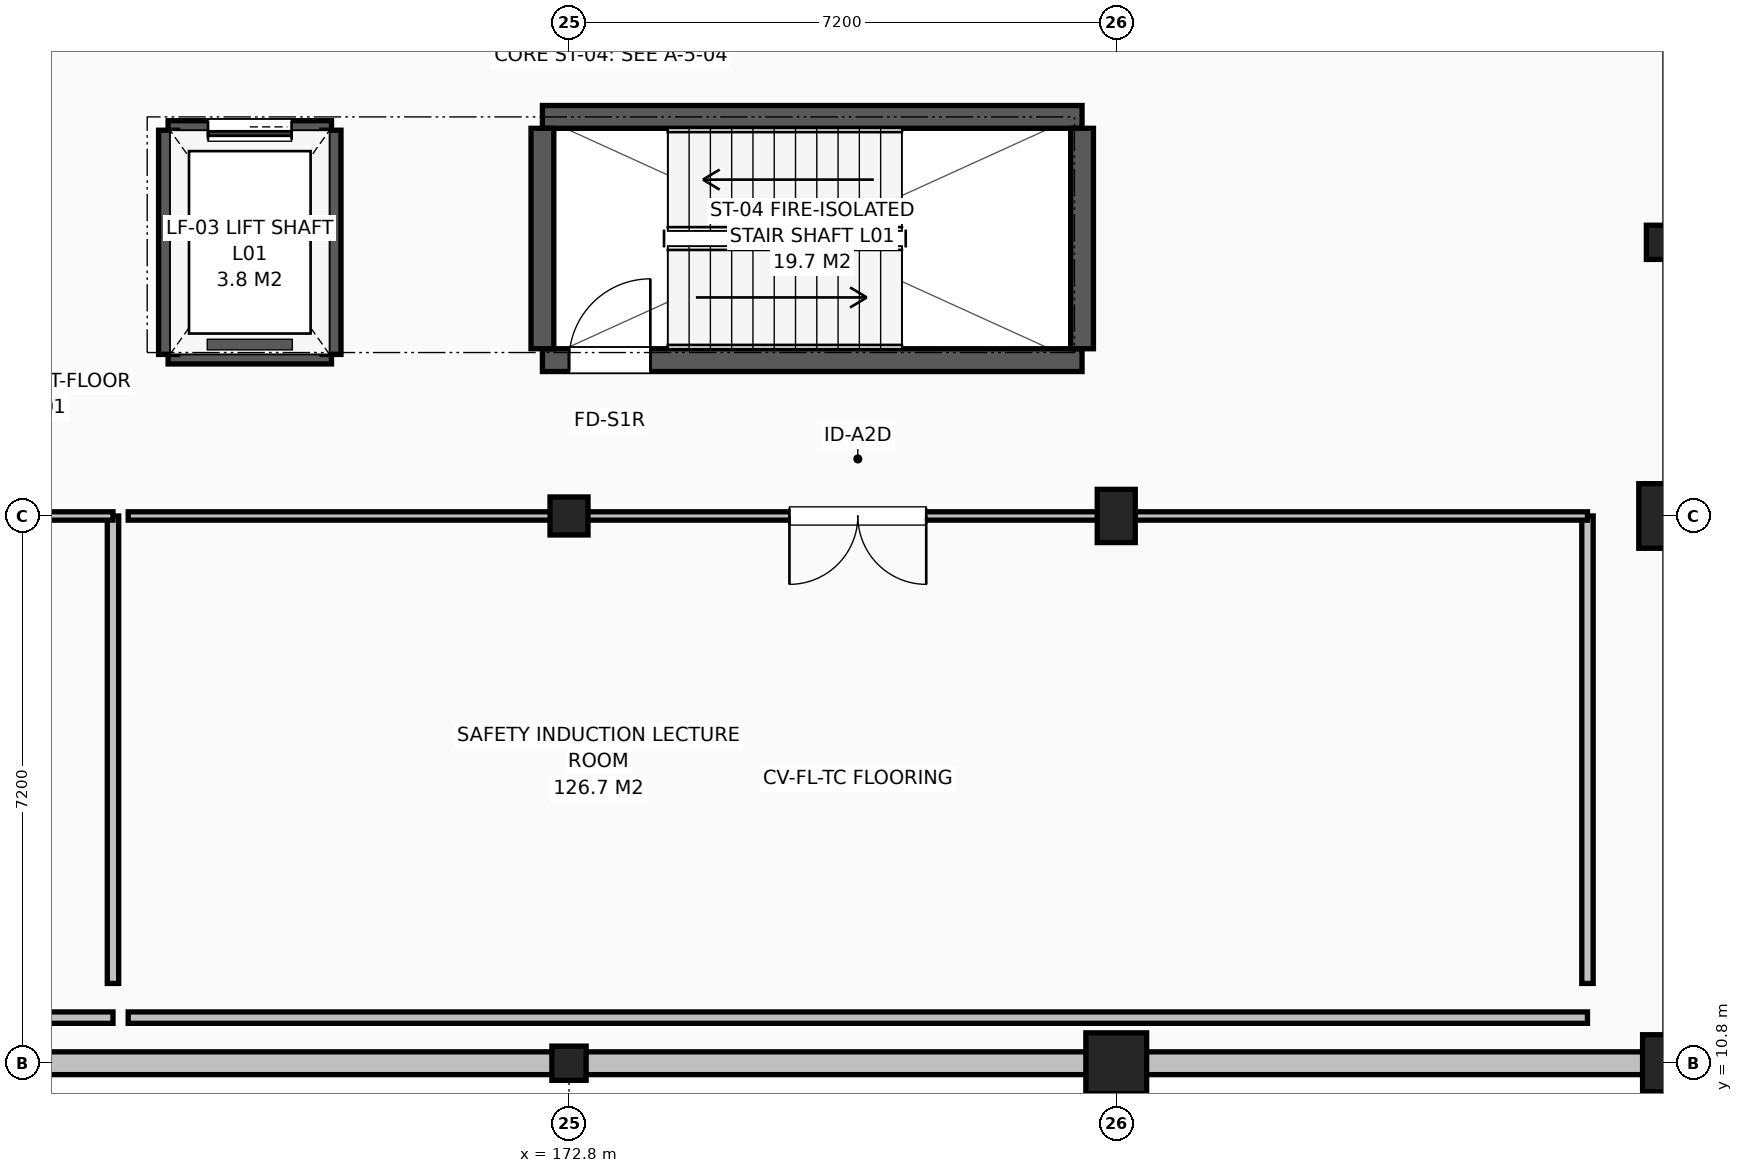
"""IFC4 building model, lengths in metres.
Left out: names, types, materials, properties, quantities, classifications, styles, units other than length and angle.
Written with IfcOpenShell. Run it as: python <this file> out.ifc"""

import sys

from ifc_helpers import new_model, si_unit, direction, frame, frame_2d, origin, origin_2d, place, context, subcontext, project, spatial, rectangle, extrude, element, fill, save


model = new_model("IFC4")
c1 = context("Model", 3, precision=1e-05, world=origin(), true_north=direction((0.0, 1.0)))
c2 = subcontext(c1, "Body", "Model", "MODEL_VIEW")
j1 = project(units=[si_unit("LENGTHUNIT", "METRE"), si_unit("PLANEANGLEUNIT", "RADIAN")], contexts=[c1])
p1 = place(None, origin())
s1 = spatial("IfcSite", under=j1, at=p1, CompositionType="ELEMENT")
p2 = place(p1, origin())
s2 = spatial("IfcBuilding", under=s1, at=p2, CompositionType="ELEMENT")
p3 = place(p2, frame((0.0, 0.0, 4.8)))
s3 = spatial("IfcBuildingStorey", under=s2, at=p3, CompositionType="ELEMENT", Elevation=4.8)
p4 = place(p3, frame((172.8, 10.8, 0.0), z_axis=(0.0, 0.0, 1.0), x_axis=(1.0, 0.0, 0.0)))
e1 = element("IfcColumn", 1, at=p4, inside=s3, PredefinedType="COLUMN", context=c2, shape_type="SweptSolid", body=[
    extrude(rectangle(XDim=0.45, YDim=0.45, at=origin_2d()), origin(), (0.0, 0.0, 1.0), 4.2),
])
p5 = place(p3, frame((172.8, 18.0, 0.0), z_axis=(0.0, 0.0, 1.0), x_axis=(1.0, 0.0, 0.0)))
e2 = element("IfcColumn", 2, at=p5, inside=s3, PredefinedType="COLUMN", context=c2, shape_type="SweptSolid", body=[
    extrude(rectangle(XDim=0.5, YDim=0.5, at=origin_2d()), origin(), (0.0, 0.0, 1.0), 4.2),
])
p6 = place(p3, frame((180.0, 10.8, 0.0), z_axis=(0.0, 0.0, 1.0), x_axis=(1.0, 0.0, 0.0)))
e3 = element("IfcColumn", 3, at=p6, inside=s3, PredefinedType="COLUMN", context=c2, shape_type="SweptSolid", body=[
    extrude(rectangle(XDim=0.8, YDim=0.8, at=origin_2d()), origin(), (0.0, 0.0, 1.0), 4.2),
])
p7 = place(p3, frame((180.0, 18.0, 0.0), z_axis=(0.0, 0.0, 1.0), x_axis=(1.0, 0.0, 0.0)))
e4 = element("IfcColumn", 4, at=p7, inside=s3, PredefinedType="COLUMN", context=c2, shape_type="SweptSolid", body=[
    extrude(rectangle(XDim=0.5, YDim=0.7, at=origin_2d()), origin(), (0.0, 0.0, 1.0), 4.2),
])
p8 = place(p3, frame((187.2, 10.8, 0.0), z_axis=(0.0, 0.0, 1.0), x_axis=(1.0, 0.0, 0.0)))
e5 = element("IfcColumn", 5, at=p8, inside=s3, PredefinedType="COLUMN", context=c2, shape_type="SweptSolid", body=[
    extrude(rectangle(XDim=0.55, YDim=0.75, at=origin_2d()), origin(), (0.0, 0.0, 1.0), 4.2),
])
p9 = place(p3, frame((187.2, 18.0, 0.0), z_axis=(0.0, 0.0, 1.0), x_axis=(1.0, 0.0, 0.0)))
e6 = element("IfcColumn", 6, at=p9, inside=s3, PredefinedType="COLUMN", context=c2, shape_type="SweptSolid", body=[
    extrude(rectangle(XDim=0.65, YDim=0.85, at=origin_2d()), origin(), (0.0, 0.0, 1.0), 4.2),
])
p10 = place(p3, frame((187.2, 21.6, 0.0), z_axis=(0.0, 0.0, 1.0), x_axis=(1.0, 0.0, 0.0)))
e7 = element("IfcColumn", 7, at=p10, inside=s3, PredefinedType="COLUMN", context=c2, shape_type="SweptSolid", body=[
    extrude(rectangle(XDim=0.45, YDim=0.45, at=origin_2d()), origin(), (0.0, 0.0, 1.0), 4.2),
])
p11 = place(p3, frame((108.0, 10.8, 0.0), z_axis=(0.0, 0.0, 1.0), x_axis=(1.0, 0.0, 0.0)))
e8 = element("IfcWall", 8, at=p11, inside=s3, PredefinedType="SOLIDWALL", context=c2, shape_type="SweptSolid", body=[
    extrude(rectangle(XDim=79.2, YDim=0.3, at=frame_2d((39.6, 0.0))), origin(), (0.0, 0.0, 1.0), 2.872),
])
p12 = place(p3, frame((172.45, 20.05, 0.0), z_axis=(0.0, 0.0, 1.0), x_axis=(1.0, 0.0, 0.0)))
e9 = element("IfcWall", 9, at=p12, inside=s3, PredefinedType="SHEAR", context=c2, shape_type="SweptSolid", body=[
    extrude(rectangle(XDim=7.1, YDim=0.3, at=frame_2d((3.55, 0.0))), origin(), (0.0, 0.0, 1.0), 3.84),
])
p13 = place(p12, frame((0.35, 0.0, 0.0)))
e10 = element("IfcOpeningElement", 10, at=p13, cuts=e9, PredefinedType="OPENING", context=c2, shape_type="SweptSolid", body=[
    extrude(rectangle(XDim=1.07, YDim=2.15, at=frame_2d((0.535, 1.075))), frame((0.0, 0.16, 0.0), z_axis=(0.0, -1.0, 0.0), x_axis=(1.0, 0.0, 0.0)), (0.0, 0.0, 1.0), 0.32),
])
p14 = place(p3, frame((179.55, 23.25, 0.0), z_axis=(0.0, 0.0, 1.0), x_axis=(-1.0, 0.0, 0.0)))
e11 = element("IfcWall", 11, at=p14, inside=s3, PredefinedType="SHEAR", context=c2, shape_type="SweptSolid", body=[
    extrude(rectangle(XDim=7.1, YDim=0.3, at=frame_2d((3.55, 0.0))), origin(), (0.0, 0.0, 1.0), 3.84),
])
for number, where, z_axis, x_axis in (
    (12, (179.55, 20.2, 0.0), (0.0, 0.0, 1.0), (0.0, 1.0, 0.0)),
    (13, (172.45, 23.1, 0.0), (0.0, 0.0, 1.0), (0.0, -1.0, 0.0)),
):
    element("IfcWall", number, at=place(p3, frame(where, z_axis=z_axis, x_axis=x_axis)), inside=s3, PredefinedType="SHEAR", context=c2, shape_type="SweptSolid", body=[
        extrude(rectangle(XDim=2.9, YDim=0.3, at=frame_2d((1.45, 0.0))), origin(), (0.0, 0.0, 1.0), 3.84),
    ])
p15 = place(p3, frame((167.525, 20.125, 0.0), z_axis=(0.0, 0.0, 1.0), x_axis=(1.0, 0.0, 0.0)))
e14 = element("IfcWall", 14, at=p15, inside=s3, PredefinedType="SHEAR", context=c2, shape_type="SweptSolid", body=[
    extrude(rectangle(XDim=2.15, YDim=0.25, at=frame_2d((1.075, 0.0))), origin(), (0.0, 0.0, 1.0), 3.9),
])
p16 = place(p3, frame((169.675, 23.075, 0.0), z_axis=(0.0, 0.0, 1.0), x_axis=(-1.0, 0.0, 0.0)))
e15 = element("IfcWall", 15, at=p16, inside=s3, PredefinedType="SHEAR", context=c2, shape_type="SweptSolid", body=[
    extrude(rectangle(XDim=2.15, YDim=0.25, at=frame_2d((1.075, 0.0))), origin(), (0.0, 0.0, 1.0), 3.9),
])
p17 = place(p16, frame((0.525, 0.0, 0.0)))
e16 = element("IfcOpeningElement", 16, at=p17, cuts=e15, PredefinedType="OPENING", context=c2, shape_type="SweptSolid", body=[
    extrude(rectangle(XDim=1.1, YDim=2.15, at=frame_2d((0.55, 1.075))), frame((0.0, 0.135, 0.0), z_axis=(0.0, -1.0, 0.0), x_axis=(1.0, 0.0, 0.0)), (0.0, 0.0, 1.0), 0.27),
])
for number, where, z_axis, x_axis in (
    (17, (167.525, 23.075, 0.0), (0.0, 0.0, 1.0), (0.0, -1.0, 0.0)),
    (18, (169.675, 20.125, 0.0), (0.0, 0.0, 1.0), (0.0, 1.0, 0.0)),
):
    element("IfcWall", number, at=place(p3, frame(where, z_axis=z_axis, x_axis=x_axis)), inside=s3, PredefinedType="SHEAR", context=c2, shape_type="SweptSolid", body=[
        extrude(rectangle(XDim=2.95, YDim=0.25, at=frame_2d((1.475, 0.0))), origin(), (0.0, 0.0, 1.0), 3.9),
    ])
p18 = place(p3, frame((166.8, 11.4, 0.0), z_axis=(0.0, 0.0, 1.0), x_axis=(-1.0, 0.0, 0.0)))
e19 = element("IfcWall", 19, at=p18, inside=s3, PredefinedType="PARTITIONING", context=c2, shape_type="SweptSolid", body=[
    extrude(rectangle(XDim=19.6, YDim=0.15, at=frame_2d((9.8, 0.0))), origin(), (0.0, 0.0, 1.0), 3.072),
])
p19 = place(p3, frame((166.8, 11.85, 0.0), z_axis=(0.0, 0.0, 1.0), x_axis=(0.0, 1.0, 0.0)))
e20 = element("IfcWall", 20, at=p19, inside=s3, PredefinedType="PARTITIONING", context=c2, shape_type="SweptSolid", body=[
    extrude(rectangle(XDim=6.15, YDim=0.15, at=frame_2d((3.075, 0.0))), origin(), (0.0, 0.0, 1.0), 3.272),
])
p20 = place(p3, frame((147.2, 18.0, 0.0), z_axis=(0.0, 0.0, 1.0), x_axis=(1.0, 0.0, 0.0)))
e21 = element("IfcWall", 21, at=p20, inside=s3, PredefinedType="PARTITIONING", context=c2, shape_type="SweptSolid", body=[
    extrude(rectangle(XDim=19.6, YDim=0.11, at=frame_2d((9.8, 0.0))), origin(), (0.0, 0.0, 1.0), 3.222),
])
p21 = place(p20, frame((9.28, 0.0, 0.0)))
e22 = element("IfcOpeningElement", 22, at=p21, cuts=e21, PredefinedType="OPENING", context=c2, shape_type="SweptSolid", body=[
    extrude(rectangle(XDim=1.04, YDim=2.15, at=frame_2d((0.52, 1.075))), frame((0.0, 0.065, 0.0), z_axis=(0.0, -1.0, 0.0), x_axis=(1.0, 0.0, 0.0)), (0.0, 0.0, 1.0), 0.13),
])
p22 = place(p3, frame((186.2, 11.4, 0.0), z_axis=(0.0, 0.0, 1.0), x_axis=(-1.0, 0.0, 0.0)))
e23 = element("IfcWall", 23, at=p22, inside=s3, PredefinedType="PARTITIONING", context=c2, shape_type="SweptSolid", body=[
    extrude(rectangle(XDim=19.2, YDim=0.15, at=frame_2d((9.6, 0.0))), origin(), (0.0, 0.0, 1.0), 2.872),
])
p23 = place(p3, frame((186.2, 11.85, 0.0), z_axis=(0.0, 0.0, 1.0), x_axis=(0.0, 1.0, 0.0)))
e24 = element("IfcWall", 24, at=p23, inside=s3, PredefinedType="PARTITIONING", context=c2, shape_type="SweptSolid", body=[
    extrude(rectangle(XDim=6.15, YDim=0.15, at=frame_2d((3.075, 0.0))), origin(), (0.0, 0.0, 1.0), 3.222),
])
p24 = place(p3, frame((167.0, 18.0, 0.0), z_axis=(0.0, 0.0, 1.0), x_axis=(1.0, 0.0, 0.0)))
e25 = element("IfcWall", 25, at=p24, inside=s3, PredefinedType="PARTITIONING", context=c2, shape_type="SweptSolid", body=[
    extrude(rectangle(XDim=19.2, YDim=0.11, at=frame_2d((9.6, 0.0))), origin(), (0.0, 0.0, 1.0), 3.172),
])
p25 = place(p24, frame((8.7, 0.0, 0.0)))
e26 = element("IfcOpeningElement", 26, at=p25, cuts=e25, PredefinedType="OPENING", context=c2, shape_type="SweptSolid", body=[
    extrude(rectangle(XDim=1.8, YDim=2.2, at=frame_2d((0.9, 1.1))), frame((0.0, 0.065, 0.0), z_axis=(0.0, -1.0, 0.0), x_axis=(1.0, 0.0, 0.0)), (0.0, 0.0, 1.0), 0.13),
])
p26 = place(p13, origin())
e27 = element("IfcDoor", 27, at=p26, inside=s3, OperationType="SINGLE_SWING_RIGHT", PredefinedType="DOOR", context=c2, shape_type="SweptSolid", body=[
    extrude(rectangle(XDim=1.07, YDim=2.15, at=frame_2d((0.535, 1.075))), frame((0.0, 0.025, 0.0), z_axis=(0.0, -1.0, 0.0), x_axis=(1.0, 0.0, 0.0)), (0.0, 0.0, 1.0), 0.05),
])
fill(e10, e27)
p27 = place(p17, origin())
e28 = element("IfcDoor", 28, at=p27, inside=s3, OperationType="SLIDING_TO_LEFT", PredefinedType="DOOR", context=c2, shape_type="SweptSolid", body=[
    extrude(rectangle(XDim=1.1, YDim=2.15, at=frame_2d((0.55, 1.075))), frame((0.0, 0.025, 0.0), z_axis=(0.0, -1.0, 0.0), x_axis=(1.0, 0.0, 0.0)), (0.0, 0.0, 1.0), 0.05),
])
fill(e16, e28)
p28 = place(p25, origin())
e29 = element("IfcDoor", 29, at=p28, inside=s3, OperationType="DOUBLE_SWING_RIGHT", PredefinedType="DOOR", context=c2, shape_type="SweptSolid", body=[
    extrude(rectangle(XDim=1.8, YDim=2.2, at=frame_2d((0.9, 1.1))), frame((0.0, 0.025, 0.0), z_axis=(0.0, -1.0, 0.0), x_axis=(1.0, 0.0, 0.0)), (0.0, 0.0, 1.0), 0.05),
])
fill(e26, e29)
save(model, sys.argv[1])
